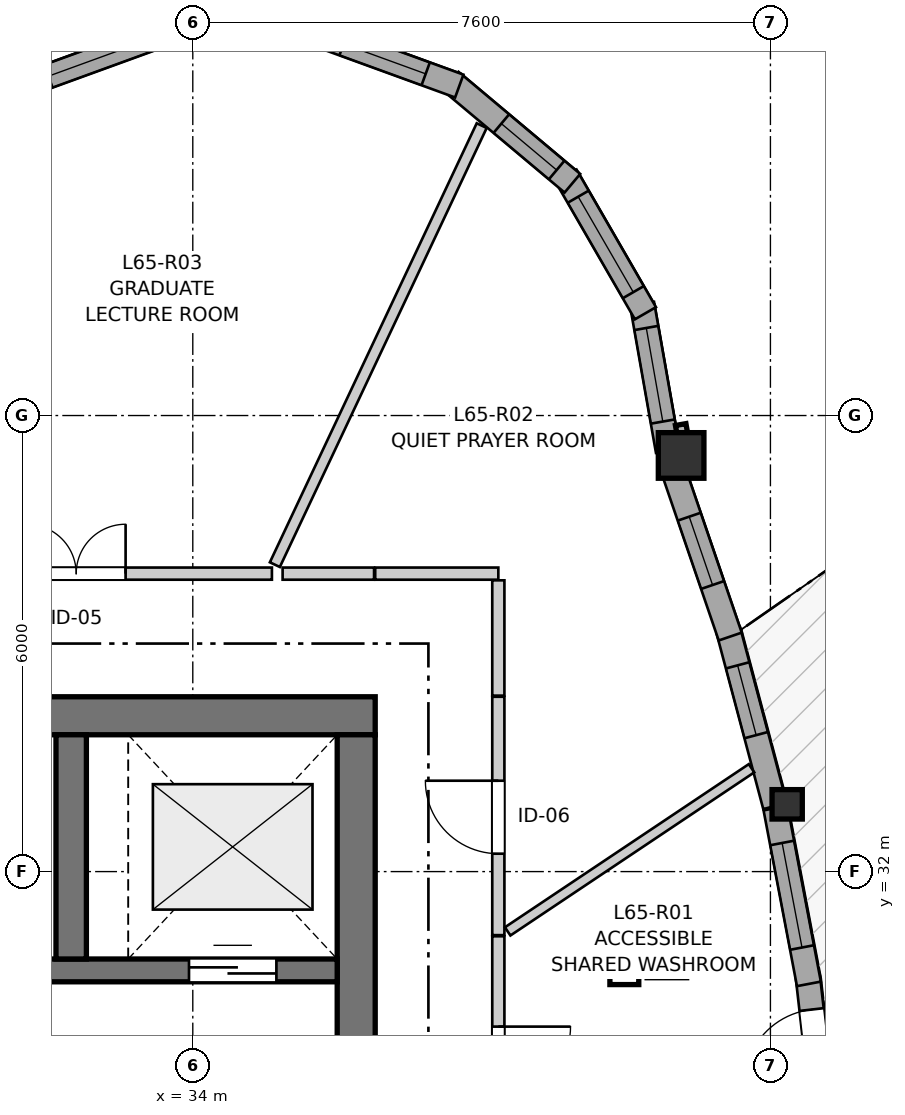
"""IFC4 building model, lengths in metres.
Left out: names, types, materials, properties, quantities, classifications, styles, units other than length and angle.
Written with IfcOpenShell. Run it as: python <this file> out.ifc"""

import sys

from ifc_helpers import new_model, si_unit, direction, frame, frame_2d, origin, origin_2d, place, context, subcontext, project, spatial, rectangle, i_section, extrude, source, transform, mapped, element, fill, save


model = new_model("IFC4")
c1 = context("Model", 3, precision=1e-05, world=origin(), true_north=direction((0.0, 1.0)))
c2 = subcontext(c1, "Body", "Model", "MODEL_VIEW")
j1 = project(units=[si_unit("LENGTHUNIT", "METRE"), si_unit("PLANEANGLEUNIT", "RADIAN")], contexts=[c1])
p1 = place(None, origin())
s1 = spatial("IfcSite", under=j1, at=p1, CompositionType="ELEMENT")
p2 = place(p1, origin())
s2 = spatial("IfcBuilding", under=s1, at=p2, CompositionType="ELEMENT")
p3 = place(p2, frame((0.0, 0.0, 218.0)))
s3 = spatial("IfcBuildingStorey", under=s2, at=p3, CompositionType="ELEMENT", Elevation=218.0)
p4 = place(p3, frame((36.4, 34.05, 0.0), z_axis=(0.0, 0.0, 1.0), x_axis=(-1.0, 0.0, 0.0)))
e1 = element("IfcWall", 1, at=p4, inside=s3, PredefinedType="SHEAR", context=c2, shape_type="SweptSolid", body=[
    extrude(rectangle(XDim=12.1, YDim=0.5, at=frame_2d((6.05, 0.0))), origin(), (0.0, 0.0, 1.0), 2.96),
])
p5 = place(p3, frame((36.15, 18.2, 0.0), z_axis=(0.0, 0.0, 1.0), x_axis=(0.0, 1.0, 0.0)))
e2 = element("IfcWall", 2, at=p5, inside=s3, PredefinedType="SHEAR", context=c2, shape_type="SweptSolid", body=[
    extrude(rectangle(XDim=15.6, YDim=0.5, at=frame_2d((7.8, 0.0))), origin(), (0.0, 0.0, 1.0), 2.96),
])
p6 = place(p5, frame((4.25, 0.0, 0.0)))
e3 = element("IfcOpeningElement", 3, at=p6, cuts=e2, PredefinedType="OPENING", context=c2, shape_type="SweptSolid", body=[
    extrude(rectangle(XDim=1.1, YDim=2.15, at=frame_2d((0.55, 1.075))), frame((0.0, 0.26, 0.0), z_axis=(0.0, -1.0, 0.0), x_axis=(1.0, 0.0, 0.0)), (0.0, 0.0, 1.0), 0.52),
])
p7 = place(p5, frame((10.25, 0.0, 0.0)))
e4 = element("IfcOpeningElement", 4, at=p7, cuts=e2, PredefinedType="OPENING", context=c2, shape_type="SweptSolid", body=[
    extrude(rectangle(XDim=1.1, YDim=2.15, at=frame_2d((0.55, 1.075))), frame((0.0, 0.26, 0.0), z_axis=(0.0, -1.0, 0.0), x_axis=(1.0, 0.0, 0.0)), (0.0, 0.0, 1.0), 0.52),
])
p8 = place(p3, frame((24.8, 30.7, 0.0), z_axis=(0.0, 0.0, 1.0), x_axis=(1.0, 0.0, 0.0)))
e5 = element("IfcWall", 5, at=p8, inside=s3, PredefinedType="SHEAR", context=c2, shape_type="SweptSolid", body=[
    extrude(rectangle(XDim=11.1, YDim=0.3, at=frame_2d((5.55, 0.0))), origin(), (0.0, 0.0, 1.0), 2.96),
])
p9 = place(p8, frame((6.22, 0.0, 0.0)))
e6 = element("IfcOpeningElement", 6, at=p9, cuts=e5, PredefinedType="OPENING", context=c2, shape_type="SweptSolid", body=[
    extrude(rectangle(XDim=0.98, YDim=2.15, at=frame_2d((0.49, 1.075))), frame((0.0, 0.16, 0.0), z_axis=(0.0, -1.0, 0.0), x_axis=(1.0, 0.0, 0.0)), (0.0, 0.0, 1.0), 0.32),
])
p10 = place(p8, frame((9.15, 0.0, 0.0)))
e7 = element("IfcOpeningElement", 7, at=p10, cuts=e5, PredefinedType="OPENING", context=c2, shape_type="SweptSolid", body=[
    extrude(rectangle(XDim=1.15, YDim=2.15, at=frame_2d((0.575, 1.075))), frame((0.0, 0.16, 0.0), z_axis=(0.0, -1.0, 0.0), x_axis=(1.0, 0.0, 0.0)), (0.0, 0.0, 1.0), 0.32),
])
p11 = place(p3, frame((32.4, 30.85, 0.0), z_axis=(0.0, 0.0, 1.0), x_axis=(0.0, 1.0, 0.0)))
e8 = element("IfcWall", 8, at=p11, inside=s3, PredefinedType="SHEAR", context=c2, shape_type="SweptSolid", body=[
    extrude(rectangle(XDim=2.95, YDim=0.4, at=frame_2d((1.475, 0.0))), origin(), (0.0, 0.0, 1.0), 2.96),
])
m1 = source(origin(), c2, "Body", "SweptSolid", [
    extrude(i_section(OverallWidth=0.398, OverallDepth=0.387, WebThickness=0.019, FlangeThickness=0.03, FilletRadius=0.015, at=origin_2d()), origin(), (0.0, 0.0, 1.0), 2.96),
])
p12 = place(p3, frame((41.82, 32.885, 0.0), z_axis=(0.0, 0.0, 1.0), x_axis=(1.0, 0.0, 0.0)))
e9 = element("IfcColumn", 9, at=p12, inside=s3, PredefinedType="PILASTER", context=c2, shape_type="MappedRepresentation", body=[
    mapped(m1, transform((0.0, 0.0, 0.0), x_axis=(1.0, 0.0, 0.0), y_axis=(0.0, 1.0, 0.0), z_axis=(0.0, 0.0, 1.0), scale=1.0)),
])
m2 = source(origin(), c2, "Body", "SweptSolid", [
    extrude(rectangle(XDim=0.6, YDim=0.6, at=origin_2d()), origin(), (0.0, 0.0, 1.0), 2.96),
])
p13 = place(p3, frame((40.425, 37.475, 0.0), z_axis=(0.0, 0.0, 1.0), x_axis=(1.0, 0.0, 0.0)))
e10 = element("IfcColumn", 10, at=p13, inside=s3, PredefinedType="COLUMN", context=c2, shape_type="MappedRepresentation", body=[
    mapped(m2, transform((0.0, 0.0, 0.0), x_axis=(1.0, 0.0, 0.0), y_axis=(0.0, 1.0, 0.0), z_axis=(0.0, 0.0, 1.0), scale=1.0)),
])
p14 = place(p3, frame((42.349, 28.366, 0.0), z_axis=(0.0, 0.0, 1.0), x_axis=(-0.113314829757, 0.99355913229, 0.0)))
e11 = element("IfcWall", 11, at=p14, inside=s3, PredefinedType="SOLIDWALL", context=c2, shape_type="SweptSolid", body=[
    extrude(rectangle(XDim=2.258, YDim=0.32, at=frame_2d((1.129, 0.0))), origin(), (0.0, 0.0, 1.0), 2.58),
])
p15 = place(p14, frame((0.83, 0.0, 0.0)))
e12 = element("IfcOpeningElement", 12, at=p15, cuts=e11, PredefinedType="OPENING", context=c2, shape_type="SweptSolid", body=[
    extrude(rectangle(XDim=1.0, YDim=2.1, at=frame_2d((0.5, 1.05))), frame((0.0, 0.17, 0.0), z_axis=(0.0, -1.0, 0.0), x_axis=(1.0, 0.0, 0.0)), (0.0, 0.0, 1.0), 0.34),
])
p16 = place(p3, frame((42.106, 30.523, 0.0), z_axis=(0.0, 0.0, 1.0), x_axis=(-0.186673658051, 0.982421979289, 0.0)))
e13 = element("IfcWall", 13, at=p16, inside=s3, PredefinedType="SOLIDWALL", context=c2, shape_type="SweptSolid", body=[
    extrude(rectangle(XDim=2.354, YDim=0.32, at=frame_2d((1.177, 0.0))), origin(), (0.0, 0.0, 1.0), 2.58),
])
p17 = place(p16, frame((0.487, 0.0, 0.82)))
e14 = element("IfcOpeningElement", 14, at=p17, cuts=e13, PredefinedType="OPENING", context=c2, shape_type="SweptSolid", body=[
    extrude(rectangle(XDim=1.4, YDim=1.35, at=frame_2d((0.7, 0.675))), frame((0.0, 0.17, 0.0), z_axis=(0.0, -1.0, 0.0), x_axis=(1.0, 0.0, 0.0)), (0.0, 0.0, 1.0), 0.34),
])
p18 = place(p3, frame((41.66, 32.863, 0.0), z_axis=(0.0, 0.0, 1.0), x_axis=(-0.257008511659, 0.966409139513, 0.0)))
e15 = element("IfcWall", 15, at=p18, inside=s3, PredefinedType="SOLIDWALL", context=c2, shape_type="SweptSolid", body=[
    extrude(rectangle(XDim=2.393, YDim=0.32, at=frame_2d((1.196, 0.0))), origin(), (0.0, 0.0, 1.0), 2.58),
])
p19 = place(p18, frame((0.965, 0.0, 0.82)))
e16 = element("IfcOpeningElement", 16, at=p19, cuts=e15, PredefinedType="OPENING", context=c2, shape_type="SweptSolid", body=[
    extrude(rectangle(XDim=0.95, YDim=1.35, at=frame_2d((0.475, 0.675))), frame((0.0, 0.17, 0.0), z_axis=(0.0, -1.0, 0.0), x_axis=(1.0, 0.0, 0.0)), (0.0, 0.0, 1.0), 0.34),
])
p20 = place(p3, frame((41.071, 35.092, 0.0), z_axis=(0.0, 0.0, 1.0), x_axis=(-0.323624668926, 0.946185538709, 0.0)))
e17 = element("IfcWall", 17, at=p20, inside=s3, PredefinedType="SOLIDWALL", context=c2, shape_type="SweptSolid", body=[
    extrude(rectangle(XDim=2.373, YDim=0.32, at=frame_2d((1.187, 0.0))), origin(), (0.0, 0.0, 1.0), 2.58),
])
p21 = place(p20, frame((0.717, 0.0, 0.82)))
e18 = element("IfcOpeningElement", 18, at=p21, cuts=e17, PredefinedType="OPENING", context=c2, shape_type="SweptSolid", body=[
    extrude(rectangle(XDim=0.95, YDim=1.35, at=frame_2d((0.475, 0.675))), frame((0.0, 0.17, 0.0), z_axis=(0.0, -1.0, 0.0), x_axis=(1.0, 0.0, 0.0)), (0.0, 0.0, 1.0), 0.34),
])
p22 = place(p3, frame((40.252, 37.536, 0.0), z_axis=(0.0, 0.0, 1.0), x_axis=(-0.173671780312, 0.984803590937, 0.0)))
e19 = element("IfcWall", 19, at=p22, inside=s3, PredefinedType="SOLIDWALL", context=c2, shape_type="SweptSolid", body=[
    extrude(rectangle(XDim=1.962, YDim=0.32, at=frame_2d((0.981, 0.0))), origin(), (0.0, 0.0, 1.0), 2.58),
])
p23 = place(p22, frame((0.391, 0.0, 0.82)))
e20 = element("IfcOpeningElement", 20, at=p23, cuts=e19, PredefinedType="OPENING", context=c2, shape_type="SweptSolid", body=[
    extrude(rectangle(XDim=1.25, YDim=1.35, at=frame_2d((0.625, 0.675))), frame((0.0, 0.17, 0.0), z_axis=(0.0, -1.0, 0.0), x_axis=(1.0, 0.0, 0.0)), (0.0, 0.0, 1.0), 0.34),
])
p24 = place(p3, frame((39.956, 39.346, 0.0), z_axis=(0.0, 0.0, 1.0), x_axis=(-0.499995423472, 0.866028046028, 0.0)))
e21 = element("IfcWall", 21, at=p24, inside=s3, PredefinedType="SOLIDWALL", context=c2, shape_type="SweptSolid", body=[
    extrude(rectangle(XDim=2.09, YDim=0.32, at=frame_2d((1.045, 0.0))), origin(), (0.0, 0.0, 1.0), 2.58),
])
p25 = place(p24, frame((0.32, 0.0, 0.82)))
e22 = element("IfcOpeningElement", 22, at=p25, cuts=e21, PredefinedType="OPENING", context=c2, shape_type="SweptSolid", body=[
    extrude(rectangle(XDim=1.45, YDim=1.25, at=frame_2d((0.725, 0.625))), frame((0.0, 0.17, 0.0), z_axis=(0.0, -1.0, 0.0), x_axis=(1.0, 0.0, 0.0)), (0.0, 0.0, 1.0), 0.34),
])
p26 = place(p3, frame((38.994, 41.056, 0.0), z_axis=(0.0, 0.0, 1.0), x_axis=(-0.766024572719, 0.642811289563, 0.0)))
e23 = element("IfcWall", 23, at=p26, inside=s3, PredefinedType="SOLIDWALL", context=c2, shape_type="SweptSolid", body=[
    extrude(rectangle(XDim=2.09, YDim=0.32, at=frame_2d((1.045, 0.0))), origin(), (0.0, 0.0, 1.0), 2.58),
])
p27 = place(p26, frame((0.271, 0.0, 0.82)))
e24 = element("IfcOpeningElement", 24, at=p27, cuts=e23, PredefinedType="OPENING", context=c2, shape_type="SweptSolid", body=[
    extrude(rectangle(XDim=0.95, YDim=1.35, at=frame_2d((0.475, 0.675))), frame((0.0, 0.17, 0.0), z_axis=(0.0, -1.0, 0.0), x_axis=(1.0, 0.0, 0.0)), (0.0, 0.0, 1.0), 0.34),
])
p28 = place(p3, frame((37.506, 42.334, 0.0), z_axis=(0.0, 0.0, 1.0), x_axis=(-0.939711556618, 0.341968113072, 0.0)))
e25 = element("IfcWall", 25, at=p28, inside=s3, PredefinedType="SOLIDWALL", context=c2, shape_type="SweptSolid", body=[
    extrude(rectangle(XDim=2.09, YDim=0.32, at=frame_2d((1.045, 0.0))), origin(), (0.0, 0.0, 1.0), 2.58),
])
p29 = place(p28, frame((0.47, 0.0, 0.82)))
e26 = element("IfcOpeningElement", 26, at=p29, cuts=e25, PredefinedType="OPENING", context=c2, shape_type="SweptSolid", body=[
    extrude(rectangle(XDim=1.15, YDim=1.2, at=frame_2d((0.575, 0.6))), frame((0.0, 0.17, 0.0), z_axis=(0.0, -1.0, 0.0), x_axis=(1.0, 0.0, 0.0)), (0.0, 0.0, 1.0), 0.34),
])
p30 = place(p3, frame((33.708, 43.049, 0.0), z_axis=(0.0, 0.0, 1.0), x_axis=(-0.939691662178, -0.342022777067, 0.0)))
e27 = element("IfcWall", 27, at=p30, inside=s3, PredefinedType="SOLIDWALL", context=c2, shape_type="SweptSolid", body=[
    extrude(rectangle(XDim=2.032, YDim=0.32, at=frame_2d((1.016, 0.0))), origin(), (0.0, 0.0, 1.0), 2.58),
])
p31 = place(p30, frame((0.261, 0.0, 0.82)))
e28 = element("IfcOpeningElement", 28, at=p31, cuts=e27, PredefinedType="OPENING", context=c2, shape_type="SweptSolid", body=[
    extrude(rectangle(XDim=1.45, YDim=1.25, at=frame_2d((0.725, 0.625))), frame((0.0, 0.17, 0.0), z_axis=(0.0, -1.0, 0.0), x_axis=(1.0, 0.0, 0.0)), (0.0, 0.0, 1.0), 0.34),
])
p32 = place(p3, frame((29.938, 35.92, 0.0), z_axis=(0.0, 0.0, 1.0), x_axis=(1.0, 0.0, 0.0)))
e29 = element("IfcWall", 29, at=p32, inside=s3, PredefinedType="PARTITIONING", context=c2, shape_type="SweptSolid", body=[
    extrude(rectangle(XDim=5.103, YDim=0.16, at=frame_2d((2.552, 0.0))), origin(), (0.0, 0.0, 1.0), 2.628),
])
p33 = place(p32, frame((1.878, 0.0, 0.0)))
e30 = element("IfcOpeningElement", 30, at=p33, cuts=e29, PredefinedType="OPENING", context=c2, shape_type="SweptSolid", body=[
    extrude(rectangle(XDim=1.3, YDim=2.1, at=frame_2d((0.65, 1.05))), frame((0.0, 0.09, 0.0), z_axis=(0.0, -1.0, 0.0), x_axis=(1.0, 0.0, 0.0)), (0.0, 0.0, 1.0), 0.18),
])
p34 = place(p3, frame((38.02, 31.149, 0.0), z_axis=(0.0, 0.0, 1.0), x_axis=(0.0, -1.0, 0.0)))
e31 = element("IfcWall", 31, at=p34, inside=s3, PredefinedType="PARTITIONING", context=c2, shape_type="SweptSolid", body=[
    extrude(rectangle(XDim=3.279, YDim=0.16, at=frame_2d((1.639, 0.0))), origin(), (0.0, 0.0, 1.0), 2.628),
])
p35 = place(p34, frame((1.188, 0.0, 0.0)))
e32 = element("IfcOpeningElement", 32, at=p35, cuts=e31, PredefinedType="OPENING", context=c2, shape_type="SweptSolid", body=[
    extrude(rectangle(XDim=0.95, YDim=2.1, at=frame_2d((0.475, 1.05))), frame((0.0, 0.09, 0.0), z_axis=(0.0, -1.0, 0.0), x_axis=(1.0, 0.0, 0.0)), (0.0, 0.0, 1.0), 0.18),
])
p36 = place(p3, frame((38.02, 31.164, 0.0), z_axis=(0.0, 0.0, 1.0), x_axis=(0.0, 1.0, 0.0)))
e33 = element("IfcWall", 33, at=p36, inside=s3, PredefinedType="PARTITIONING", context=c2, shape_type="SweptSolid", body=[
    extrude(rectangle(XDim=3.136, YDim=0.16, at=frame_2d((1.568, 0.0))), origin(), (0.0, 0.0, 1.0), 2.628),
])
p37 = place(p36, frame((1.072, 0.0, 0.0)))
e34 = element("IfcOpeningElement", 34, at=p37, cuts=e33, PredefinedType="OPENING", context=c2, shape_type="SweptSolid", body=[
    extrude(rectangle(XDim=0.96, YDim=2.1, at=frame_2d((0.48, 1.05))), frame((0.0, 0.09, 0.0), z_axis=(0.0, -1.0, 0.0), x_axis=(1.0, 0.0, 0.0)), (0.0, 0.0, 1.0), 0.18),
])
p38 = place(p3, frame((35.08, 36.038, 0.0), z_axis=(0.0, 0.0, 1.0), x_axis=(0.426214985607, 0.904621902258, 0.0)))
e35 = element("IfcWall", 35, at=p38, inside=s3, PredefinedType="PARTITIONING", context=c2, shape_type="SweptSolid", body=[
    extrude(rectangle(XDim=6.385, YDim=0.145, at=frame_2d((3.192, 0.0))), origin(), (0.0, 0.0, 1.0), 2.96),
])
p39 = place(p3, frame((38.143, 31.213, 0.0), z_axis=(0.0, 0.0, 1.0), x_axis=(0.831154063558, 0.556042195009, 0.0)))
e36 = element("IfcWall", 36, at=p39, inside=s3, PredefinedType="PARTITIONING", context=c2, shape_type="SweptSolid", body=[
    extrude(rectangle(XDim=3.86, YDim=0.13, at=frame_2d((1.93, 0.0))), origin(), (0.0, 0.0, 1.0), 2.96),
])
p40 = place(p3, frame((36.4, 35.92, 0.0), z_axis=(0.0, 0.0, 1.0), x_axis=(1.0, 0.0, 0.0)))
e37 = element("IfcWall", 37, at=p40, inside=s3, PredefinedType="PARTITIONING", context=c2, shape_type="SweptSolid", body=[
    extrude(rectangle(XDim=1.62, YDim=0.16, at=frame_2d((0.81, 0.0))), origin(), (0.0, 0.0, 1.0), 2.96),
])
p41 = place(p3, frame((38.02, 34.315, 0.0), z_axis=(0.0, 0.0, 1.0), x_axis=(0.0, 1.0, 0.0)))
e38 = element("IfcWall", 38, at=p41, inside=s3, PredefinedType="PARTITIONING", context=c2, shape_type="SweptSolid", body=[
    extrude(rectangle(XDim=1.517, YDim=0.16, at=frame_2d((0.759, 0.0))), origin(), (0.0, 0.0, 1.0), 2.628),
])
p42 = place(p3, frame((35.182, 35.92, 0.0), z_axis=(0.0, 0.0, 1.0), x_axis=(1.0, 0.0, 0.0)))
e39 = element("IfcWall", 39, at=p42, inside=s3, PredefinedType="PARTITIONING", context=c2, shape_type="SweptSolid", body=[
    extrude(rectangle(XDim=1.203, YDim=0.16, at=frame_2d((0.602, 0.0))), origin(), (0.0, 0.0, 1.0), 2.96),
])
m3 = source(origin(), c2, "Body", "SweptSolid", [
    extrude(rectangle(XDim=1.0, YDim=2.1, at=frame_2d((0.5, 1.05))), frame((0.0, 0.025, 0.0), z_axis=(0.0, -1.0, 0.0), x_axis=(1.0, 0.0, 0.0)), (0.0, 0.0, 1.0), 0.05),
])
p43 = place(p15, origin())
e40 = element("IfcDoor", 40, at=p43, inside=s3, OperationType="SINGLE_SWING_LEFT", PredefinedType="DOOR", context=c2, shape_type="MappedRepresentation", body=[
    mapped(m3, transform((0.0, 0.0, 0.0), x_axis=(1.0, 0.0, 0.0), y_axis=(0.0, 1.0, 0.0), z_axis=(0.0, 0.0, 1.0), scale=1.0)),
])
fill(e12, e40)
m4 = source(origin(), c2, "Body", "SweptSolid", [
    extrude(rectangle(XDim=1.4, YDim=1.35, at=frame_2d((0.7, 0.675))), frame((0.0, 0.03, 0.0), z_axis=(0.0, -1.0, 0.0), x_axis=(1.0, 0.0, 0.0)), (0.0, 0.0, 1.0), 0.06),
])
p44 = place(p17, origin())
e41 = element("IfcWindow", 41, at=p44, inside=s3, PartitioningType="SINGLE_PANEL", PredefinedType="WINDOW", context=c2, shape_type="MappedRepresentation", body=[
    mapped(m4, transform((0.0, 0.0, 0.0), x_axis=(1.0, 0.0, 0.0), y_axis=(0.0, 1.0, 0.0), z_axis=(0.0, 0.0, 1.0), scale=1.0)),
])
fill(e14, e41)
m5 = source(origin(), c2, "Body", "SweptSolid", [
    extrude(rectangle(XDim=0.95, YDim=1.35, at=frame_2d((0.475, 0.675))), frame((0.0, 0.03, 0.0), z_axis=(0.0, -1.0, 0.0), x_axis=(1.0, 0.0, 0.0)), (0.0, 0.0, 1.0), 0.06),
])
p45 = place(p19, origin())
e42 = element("IfcWindow", 42, at=p45, inside=s3, PartitioningType="SINGLE_PANEL", PredefinedType="WINDOW", context=c2, shape_type="MappedRepresentation", body=[
    mapped(m5, transform((0.0, 0.0, 0.0), x_axis=(1.0, 0.0, 0.0), y_axis=(0.0, 1.0, 0.0), z_axis=(0.0, 0.0, 1.0), scale=1.0)),
])
fill(e16, e42)
p46 = place(p21, origin())
e43 = element("IfcWindow", 43, at=p46, inside=s3, PartitioningType="SINGLE_PANEL", PredefinedType="WINDOW", context=c2, shape_type="MappedRepresentation", body=[
    mapped(m5, transform((0.0, 0.0, 0.0), x_axis=(1.0, 0.0, 0.0), y_axis=(0.0, 1.0, 0.0), z_axis=(0.0, 0.0, 1.0), scale=1.0)),
])
fill(e18, e43)
m6 = source(origin(), c2, "Body", "SweptSolid", [
    extrude(rectangle(XDim=1.25, YDim=1.35, at=frame_2d((0.625, 0.675))), frame((0.0, 0.03, 0.0), z_axis=(0.0, -1.0, 0.0), x_axis=(1.0, 0.0, 0.0)), (0.0, 0.0, 1.0), 0.06),
])
p47 = place(p23, origin())
e44 = element("IfcWindow", 44, at=p47, inside=s3, PartitioningType="SINGLE_PANEL", PredefinedType="WINDOW", context=c2, shape_type="MappedRepresentation", body=[
    mapped(m6, transform((0.0, 0.0, 0.0), x_axis=(1.0, 0.0, 0.0), y_axis=(0.0, 1.0, 0.0), z_axis=(0.0, 0.0, 1.0), scale=1.0)),
])
fill(e20, e44)
m7 = source(origin(), c2, "Body", "SweptSolid", [
    extrude(rectangle(XDim=1.45, YDim=1.25, at=frame_2d((0.725, 0.625))), frame((0.0, 0.03, 0.0), z_axis=(0.0, -1.0, 0.0), x_axis=(1.0, 0.0, 0.0)), (0.0, 0.0, 1.0), 0.06),
])
p48 = place(p25, origin())
e45 = element("IfcWindow", 45, at=p48, inside=s3, PartitioningType="SINGLE_PANEL", PredefinedType="WINDOW", context=c2, shape_type="MappedRepresentation", body=[
    mapped(m7, transform((0.0, 0.0, 0.0), x_axis=(1.0, 0.0, 0.0), y_axis=(0.0, 1.0, 0.0), z_axis=(0.0, 0.0, 1.0), scale=1.0)),
])
fill(e22, e45)
p49 = place(p27, origin())
e46 = element("IfcWindow", 46, at=p49, inside=s3, PartitioningType="SINGLE_PANEL", PredefinedType="WINDOW", context=c2, shape_type="MappedRepresentation", body=[
    mapped(m5, transform((0.0, 0.0, 0.0), x_axis=(1.0, 0.0, 0.0), y_axis=(0.0, 1.0, 0.0), z_axis=(0.0, 0.0, 1.0), scale=1.0)),
])
fill(e24, e46)
m8 = source(origin(), c2, "Body", "SweptSolid", [
    extrude(rectangle(XDim=1.15, YDim=1.2, at=frame_2d((0.575, 0.6))), frame((0.0, 0.03, 0.0), z_axis=(0.0, -1.0, 0.0), x_axis=(1.0, 0.0, 0.0)), (0.0, 0.0, 1.0), 0.06),
])
p50 = place(p29, origin())
e47 = element("IfcWindow", 47, at=p50, inside=s3, PartitioningType="SINGLE_PANEL", PredefinedType="WINDOW", context=c2, shape_type="MappedRepresentation", body=[
    mapped(m8, transform((0.0, 0.0, 0.0), x_axis=(1.0, 0.0, 0.0), y_axis=(0.0, 1.0, 0.0), z_axis=(0.0, 0.0, 1.0), scale=1.0)),
])
fill(e26, e47)
p51 = place(p31, origin())
e48 = element("IfcWindow", 48, at=p51, inside=s3, PartitioningType="SINGLE_PANEL", PredefinedType="WINDOW", context=c2, shape_type="MappedRepresentation", body=[
    mapped(m7, transform((0.0, 0.0, 0.0), x_axis=(1.0, 0.0, 0.0), y_axis=(0.0, 1.0, 0.0), z_axis=(0.0, 0.0, 1.0), scale=1.0)),
])
fill(e28, e48)
m9 = source(origin(), c2, "Body", "SweptSolid", [
    extrude(rectangle(XDim=1.15, YDim=2.15, at=frame_2d((0.575, 1.075))), frame((0.0, 0.025, 0.0), z_axis=(0.0, -1.0, 0.0), x_axis=(1.0, 0.0, 0.0)), (0.0, 0.0, 1.0), 0.05),
])
p52 = place(p10, origin())
e49 = element("IfcDoor", 49, at=p52, inside=s3, OperationType="DOUBLE_DOOR_SLIDING", PredefinedType="DOOR", context=c2, shape_type="MappedRepresentation", body=[
    mapped(m9, transform((0.0, 0.0, 0.0), x_axis=(1.0, 0.0, 0.0), y_axis=(0.0, 1.0, 0.0), z_axis=(0.0, 0.0, 1.0), scale=1.0)),
])
fill(e7, e49)
m10 = source(origin(), c2, "Body", "SweptSolid", [
    extrude(rectangle(XDim=1.3, YDim=2.1, at=frame_2d((0.65, 1.05))), frame((0.0, 0.025, 0.0), z_axis=(0.0, -1.0, 0.0), x_axis=(1.0, 0.0, 0.0)), (0.0, 0.0, 1.0), 0.05),
])
p53 = place(p33, origin())
e50 = element("IfcDoor", 50, at=p53, inside=s3, OperationType="DOUBLE_DOOR_SINGLE_SWING", PredefinedType="DOOR", context=c2, shape_type="MappedRepresentation", body=[
    mapped(m10, transform((0.0, 0.0, 0.0), x_axis=(1.0, 0.0, 0.0), y_axis=(0.0, 1.0, 0.0), z_axis=(0.0, 0.0, 1.0), scale=1.0)),
])
fill(e30, e50)
m11 = source(origin(), c2, "Body", "SweptSolid", [
    extrude(rectangle(XDim=0.95, YDim=2.1, at=frame_2d((0.475, 1.05))), frame((0.0, 0.025, 0.0), z_axis=(0.0, -1.0, 0.0), x_axis=(1.0, 0.0, 0.0)), (0.0, 0.0, 1.0), 0.05),
])
p54 = place(p35, origin())
e51 = element("IfcDoor", 51, at=p54, inside=s3, OperationType="SINGLE_SWING_LEFT", PredefinedType="DOOR", context=c2, shape_type="MappedRepresentation", body=[
    mapped(m11, transform((0.0, 0.0, 0.0), x_axis=(1.0, 0.0, 0.0), y_axis=(0.0, 1.0, 0.0), z_axis=(0.0, 0.0, 1.0), scale=1.0)),
])
fill(e32, e51)
m12 = source(origin(), c2, "Body", "SweptSolid", [
    extrude(rectangle(XDim=0.96, YDim=2.1, at=frame_2d((0.48, 1.05))), frame((0.0, 0.025, 0.0), z_axis=(0.0, -1.0, 0.0), x_axis=(1.0, 0.0, 0.0)), (0.0, 0.0, 1.0), 0.05),
])
p55 = place(p37, origin())
e52 = element("IfcDoor", 52, at=p55, inside=s3, OperationType="SINGLE_SWING_RIGHT", PredefinedType="DOOR", context=c2, shape_type="MappedRepresentation", body=[
    mapped(m12, transform((0.0, 0.0, 0.0), x_axis=(1.0, 0.0, 0.0), y_axis=(0.0, 1.0, 0.0), z_axis=(0.0, 0.0, 1.0), scale=1.0)),
])
fill(e34, e52)
save(model, sys.argv[1])
